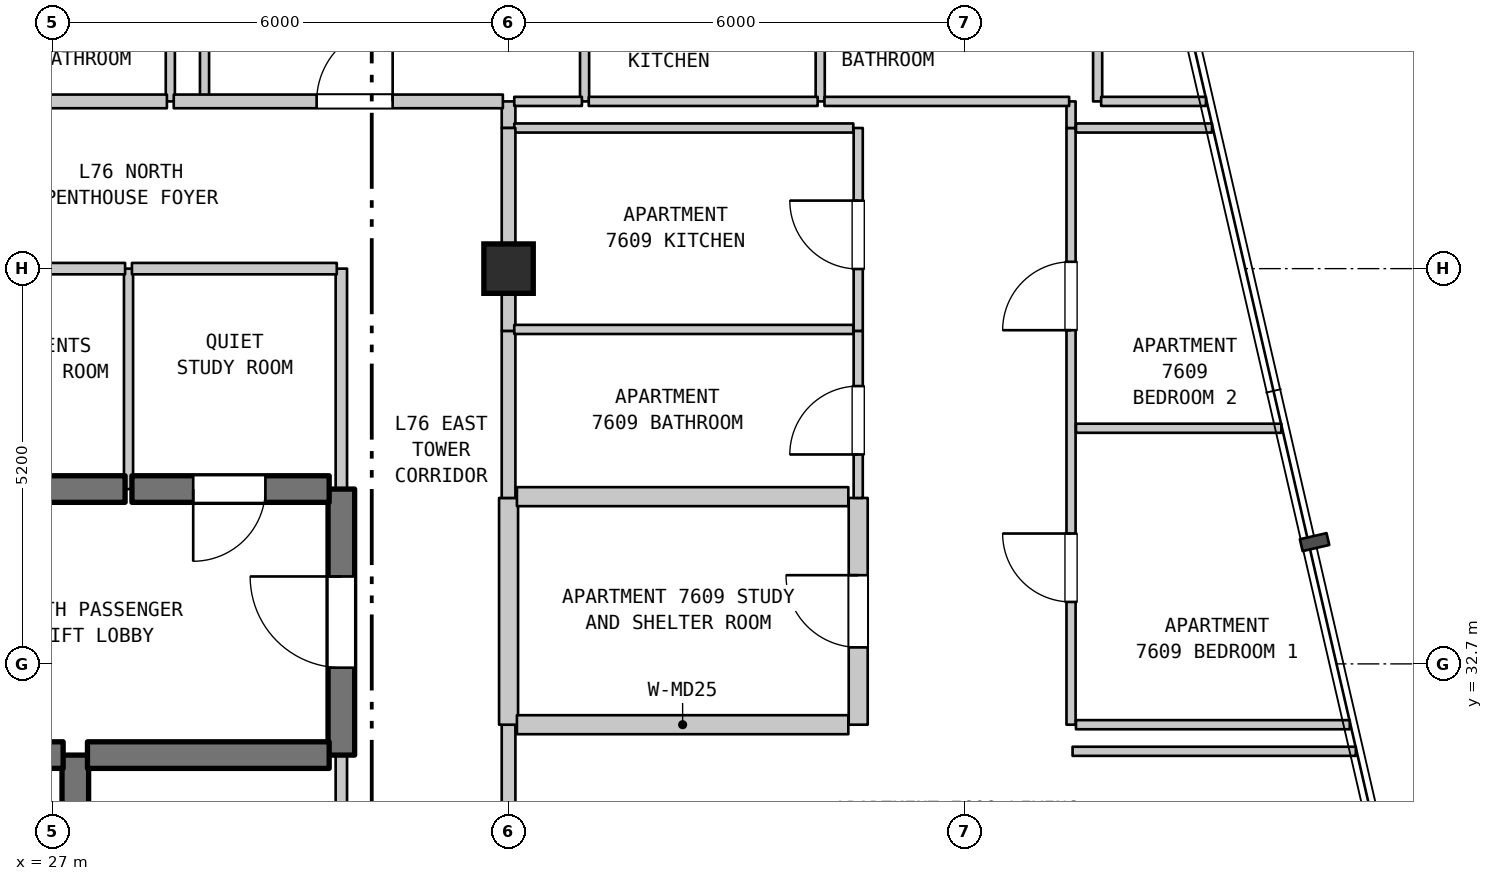
"""IFC4 building model, lengths in metres.
Left out: names, types, materials, properties, quantities, classifications, styles, units other than length and angle.
Written with IfcOpenShell. Run it as: python <this file> out.ifc"""

import sys

from ifc_helpers import new_model, si_unit, direction, frame, frame_2d, origin, origin_2d, place, context, subcontext, project, spatial, rectangle, extrude, element, fill, save


model = new_model("IFC4")
c1 = context("Model", 3, precision=1e-05, world=origin(), true_north=direction((0.0, 1.0)))
c2 = subcontext(c1, "Body", "Model", "MODEL_VIEW")
j1 = project(units=[si_unit("LENGTHUNIT", "METRE"), si_unit("PLANEANGLEUNIT", "RADIAN")], contexts=[c1])
p1 = place(None, origin())
s1 = spatial("IfcSite", under=j1, at=p1, CompositionType="ELEMENT")
p2 = place(p1, origin())
s2 = spatial("IfcBuilding", under=s1, at=p2, CompositionType="ELEMENT")
p3 = place(p2, frame((0.0, 0.0, 303.6)))
s3 = spatial("IfcBuildingStorey", under=s2, at=p3, CompositionType="ELEMENT", Elevation=303.6)
p4 = place(p3, frame((33.0, 37.9, 0.0), z_axis=(0.0, 0.0, 1.0), x_axis=(1.0, 0.0, 0.0)))
e1 = element("IfcColumn", 1, at=p4, inside=s3, PredefinedType="COLUMN", context=c2, shape_type="SweptSolid", body=[
    extrude(rectangle(XDim=0.65, YDim=0.65, at=origin_2d()), origin(), (0.0, 0.0, 1.0), 3.7),
])
p5 = place(p3, frame((27.3, 28.9, 0.0), z_axis=(0.0, 0.0, 1.0), x_axis=(0.0, 1.0, 0.0)))
e2 = element("IfcWall", 2, at=p5, inside=s3, PredefinedType="SHEAR", context=c2, shape_type="SweptSolid", body=[
    extrude(rectangle(XDim=2.6, YDim=0.35, at=frame_2d((1.3, 0.0))), origin(), (0.0, 0.0, 1.0), 3.39),
])
p6 = place(p3, frame((28.0, 35.0, 0.0), z_axis=(0.0, 0.0, 1.0), x_axis=(0.0, 1.0, 0.0)))
e3 = element("IfcWall", 3, at=p6, inside=s3, PredefinedType="PARTITIONING", context=c2, shape_type="SweptSolid", body=[
    extrude(rectangle(XDim=2.9, YDim=0.12, at=frame_2d((1.45, 0.0))), origin(), (0.0, 0.0, 1.0), 3.39),
])
p7 = place(p3, frame((28.55, 40.1, 0.0), z_axis=(0.0, 0.0, 1.0), x_axis=(0.0, 1.0, 0.0)))
e4 = element("IfcWall", 4, at=p7, inside=s3, PredefinedType="PARTITIONING", context=c2, shape_type="SweptSolid", body=[
    extrude(rectangle(XDim=2.3, YDim=0.12, at=frame_2d((1.15, 0.0))), origin(), (0.0, 0.0, 1.0), 3.39),
])
p8 = place(p3, frame((29.0, 40.1, 0.0), z_axis=(0.0, 0.0, 1.0), x_axis=(0.0, 1.0, 0.0)))
e5 = element("IfcWall", 5, at=p8, inside=s3, PredefinedType="PARTITIONING", context=c2, shape_type="SweptSolid", body=[
    extrude(rectangle(XDim=2.05, YDim=0.12, at=frame_2d((1.025, 0.0))), origin(), (0.0, 0.0, 1.0), 3.39),
])
p9 = place(p3, frame((30.8, 28.9, 0.0), z_axis=(0.0, 0.0, 1.0), x_axis=(0.0, 1.0, 0.0)))
e6 = element("IfcWall", 6, at=p9, inside=s3, PredefinedType="STANDARD", context=c2, shape_type="SweptSolid", body=[
    extrude(rectangle(XDim=2.6, YDim=0.15, at=frame_2d((1.3, 0.0))), origin(), (0.0, 0.0, 1.0), 3.39),
])
p10 = place(p3, frame((30.8, 31.5, 0.0), z_axis=(0.0, 0.0, 1.0), x_axis=(0.0, 1.0, 0.0)))
e7 = element("IfcWall", 7, at=p10, inside=s3, PredefinedType="SHEAR", context=c2, shape_type="SweptSolid", body=[
    extrude(rectangle(XDim=3.5, YDim=0.35, at=frame_2d((1.75, 0.0))), origin(), (0.0, 0.0, 1.0), 3.39),
])
p11 = place(p10, frame((1.15, 0.0, 0.0)))
e8 = element("IfcOpeningElement", 8, at=p11, cuts=e7, PredefinedType="OPENING", context=c2, shape_type="SweptSolid", body=[
    extrude(rectangle(XDim=1.2, YDim=2.2, at=frame_2d((0.6, 1.1))), frame((0.0, 0.185, 0.0), z_axis=(0.0, -1.0, 0.0), x_axis=(1.0, 0.0, 0.0)), (0.0, 0.0, 1.0), 0.37),
])
p12 = place(p3, frame((30.8, 35.0, 0.0), z_axis=(0.0, 0.0, 1.0), x_axis=(0.0, 1.0, 0.0)))
e9 = element("IfcWall", 9, at=p12, inside=s3, PredefinedType="STANDARD", context=c2, shape_type="SweptSolid", body=[
    extrude(rectangle(XDim=2.9, YDim=0.15, at=frame_2d((1.45, 0.0))), origin(), (0.0, 0.0, 1.0), 3.39),
])
p13 = place(p3, frame((33.0, 28.8, 0.0), z_axis=(0.0, 0.0, 1.0), x_axis=(0.0, 1.0, 0.0)))
e10 = element("IfcWall", 10, at=p13, inside=s3, PredefinedType="STANDARD", context=c2, shape_type="SweptSolid", body=[
    extrude(rectangle(XDim=3.1, YDim=0.18, at=frame_2d((1.55, 0.0))), origin(), (0.0, 0.0, 1.0), 2.89),
])
p14 = place(p13, frame((0.978, 0.0, 0.0)))
e11 = element("IfcOpeningElement", 11, at=p14, cuts=e10, PredefinedType="OPENING", context=c2, shape_type="SweptSolid", body=[
    extrude(rectangle(XDim=1.0, YDim=2.15, at=frame_2d((0.5, 1.075))), frame((0.0, 0.1, 0.0), z_axis=(0.0, -1.0, 0.0), x_axis=(1.0, 0.0, 0.0)), (0.0, 0.0, 1.0), 0.2),
])
p15 = place(p3, frame((33.0, 31.9, 0.0), z_axis=(0.0, 0.0, 1.0), x_axis=(0.0, 1.0, 0.0)))
e12 = element("IfcWall", 12, at=p15, inside=s3, PredefinedType="STANDARD", context=c2, shape_type="SweptSolid", body=[
    extrude(rectangle(XDim=2.983, YDim=0.25, at=frame_2d((1.492, 0.0))), origin(), (0.0, 0.0, 1.0), 2.89),
])
p16 = place(p3, frame((33.0, 34.883, 0.0), z_axis=(0.0, 0.0, 1.0), x_axis=(0.0, 1.0, 0.0)))
e13 = element("IfcWall", 13, at=p16, inside=s3, PredefinedType="STANDARD", context=c2, shape_type="SweptSolid", body=[
    extrude(rectangle(XDim=2.198, YDim=0.18, at=frame_2d((1.099, 0.0))), origin(), (0.0, 0.0, 1.0), 2.89),
])
p17 = place(p3, frame((33.0, 37.081, 0.0), z_axis=(0.0, 0.0, 1.0), x_axis=(0.0, 1.0, 0.0)))
e14 = element("IfcWall", 14, at=p17, inside=s3, PredefinedType="STANDARD", context=c2, shape_type="SweptSolid", body=[
    extrude(rectangle(XDim=0.819, YDim=0.18, at=frame_2d((0.409, 0.0))), origin(), (0.0, 0.0, 1.0), 2.89),
])
p18 = place(p3, frame((33.0, 39.75, 0.0), z_axis=(0.0, 0.0, 1.0), x_axis=(0.0, 1.0, 0.0)))
e15 = element("IfcWall", 15, at=p18, inside=s3, PredefinedType="STANDARD", context=c2, shape_type="SweptSolid", body=[
    extrude(rectangle(XDim=0.35, YDim=0.18, at=frame_2d((0.175, 0.0))), origin(), (0.0, 0.0, 1.0), 3.39),
])
for number, where, z_axis, x_axis in (
    (16, (34.0, 40.1, 0.0), (0.0, 0.0, 1.0), (0.0, 1.0, 0.0)),
    (17, (37.1, 40.1, 0.0), (0.0, 0.0, 1.0), (0.0, 1.0, 0.0)),
):
    element("IfcWall", number, at=place(p3, frame(where, z_axis=z_axis, x_axis=x_axis)), inside=s3, PredefinedType="PARTITIONING", context=c2, shape_type="SweptSolid", body=[
        extrude(rectangle(XDim=2.3, YDim=0.12, at=frame_2d((1.15, 0.0))), origin(), (0.0, 0.0, 1.0), 3.39),
    ])
p19 = place(p3, frame((37.6, 31.9, 0.0), z_axis=(0.0, 0.0, 1.0), x_axis=(0.0, 1.0, 0.0)))
e18 = element("IfcWall", 18, at=p19, inside=s3, PredefinedType="STANDARD", context=c2, shape_type="SweptSolid", body=[
    extrude(rectangle(XDim=2.983, YDim=0.25, at=frame_2d((1.492, 0.0))), origin(), (0.0, 0.0, 1.0), 3.39),
])
p20 = place(p19, frame((1.017, 0.0, 0.0)))
e19 = element("IfcOpeningElement", 19, at=p20, cuts=e18, PredefinedType="OPENING", context=c2, shape_type="SweptSolid", body=[
    extrude(rectangle(XDim=0.95, YDim=2.15, at=frame_2d((0.475, 1.075))), frame((0.0, 0.135, 0.0), z_axis=(0.0, -1.0, 0.0), x_axis=(1.0, 0.0, 0.0)), (0.0, 0.0, 1.0), 0.27),
])
p21 = place(p3, frame((37.6, 34.883, 0.0), z_axis=(0.0, 0.0, 1.0), x_axis=(0.0, 1.0, 0.0)))
e20 = element("IfcWall", 20, at=p21, inside=s3, PredefinedType="PARTITIONING", context=c2, shape_type="SweptSolid", body=[
    extrude(rectangle(XDim=2.198, YDim=0.12, at=frame_2d((1.099, 0.0))), origin(), (0.0, 0.0, 1.0), 3.39),
])
p22 = place(p21, frame((0.572, 0.0, 0.0)))
e21 = element("IfcOpeningElement", 21, at=p22, cuts=e20, PredefinedType="OPENING", context=c2, shape_type="SweptSolid", body=[
    extrude(rectangle(XDim=0.9, YDim=2.1, at=frame_2d((0.45, 1.05))), frame((0.0, 0.07, 0.0), z_axis=(0.0, -1.0, 0.0), x_axis=(1.0, 0.0, 0.0)), (0.0, 0.0, 1.0), 0.14),
])
p23 = place(p3, frame((37.6, 37.081, 0.0), z_axis=(0.0, 0.0, 1.0), x_axis=(0.0, 1.0, 0.0)))
e22 = element("IfcWall", 22, at=p23, inside=s3, PredefinedType="PARTITIONING", context=c2, shape_type="SweptSolid", body=[
    extrude(rectangle(XDim=2.669, YDim=0.12, at=frame_2d((1.334, 0.0))), origin(), (0.0, 0.0, 1.0), 3.39),
])
p24 = place(p23, frame((0.814, 0.0, 0.0)))
e23 = element("IfcOpeningElement", 23, at=p24, cuts=e22, PredefinedType="OPENING", context=c2, shape_type="SweptSolid", body=[
    extrude(rectangle(XDim=0.9, YDim=2.15, at=frame_2d((0.45, 1.075))), frame((0.0, 0.07, 0.0), z_axis=(0.0, -1.0, 0.0), x_axis=(1.0, 0.0, 0.0)), (0.0, 0.0, 1.0), 0.14),
])
p25 = place(p3, frame((40.4, 31.9, 0.0), z_axis=(0.0, 0.0, 1.0), x_axis=(0.0, 1.0, 0.0)))
e24 = element("IfcWall", 24, at=p25, inside=s3, PredefinedType="PARTITIONING", context=c2, shape_type="SweptSolid", body=[
    extrude(rectangle(XDim=7.85, YDim=0.12, at=frame_2d((3.925, 0.0))), origin(), (0.0, 0.0, 1.0), 3.39),
])
p26 = place(p25, frame((1.615, 0.0, 0.0)))
e25 = element("IfcOpeningElement", 25, at=p26, cuts=e24, PredefinedType="OPENING", context=c2, shape_type="SweptSolid", body=[
    extrude(rectangle(XDim=0.9, YDim=2.15, at=frame_2d((0.45, 1.075))), frame((0.0, 0.07, 0.0), z_axis=(0.0, -1.0, 0.0), x_axis=(1.0, 0.0, 0.0)), (0.0, 0.0, 1.0), 0.14),
])
p27 = place(p25, frame((5.19, 0.0, 0.0)))
e26 = element("IfcOpeningElement", 26, at=p27, cuts=e24, PredefinedType="OPENING", context=c2, shape_type="SweptSolid", body=[
    extrude(rectangle(XDim=0.9, YDim=2.15, at=frame_2d((0.45, 1.075))), frame((0.0, 0.07, 0.0), z_axis=(0.0, -1.0, 0.0), x_axis=(1.0, 0.0, 0.0)), (0.0, 0.0, 1.0), 0.14),
])
p28 = place(p3, frame((40.4, 39.75, 0.0), z_axis=(0.0, 0.0, 1.0), x_axis=(0.0, 1.0, 0.0)))
e27 = element("IfcWall", 27, at=p28, inside=s3, PredefinedType="PARTITIONING", context=c2, shape_type="SweptSolid", body=[
    extrude(rectangle(XDim=0.35, YDim=0.12, at=frame_2d((0.175, 0.0))), origin(), (0.0, 0.0, 1.0), 3.39),
])
p29 = place(p3, frame((40.75, 40.1, 0.0), z_axis=(0.0, 0.0, 1.0), x_axis=(0.0, 1.0, 0.0)))
e28 = element("IfcWall", 28, at=p29, inside=s3, PredefinedType="PARTITIONING", context=c2, shape_type="SweptSolid", body=[
    extrude(rectangle(XDim=2.3, YDim=0.12, at=frame_2d((1.15, 0.0))), origin(), (0.0, 0.0, 1.0), 3.39),
])
p30 = place(p3, frame((23.96, 31.5, 0.0), z_axis=(0.0, 0.0, 1.0), x_axis=(1.0, 0.0, 0.0)))
e29 = element("IfcWall", 29, at=p30, inside=s3, PredefinedType="SHEAR", context=c2, shape_type="SweptSolid", body=[
    extrude(rectangle(XDim=3.18, YDim=0.35, at=frame_2d((1.59, 0.0))), origin(), (0.0, 0.0, 1.0), 3.39),
])
p31 = place(p30, frame((1.094, 0.0, 0.0)))
e30 = element("IfcOpeningElement", 30, at=p31, cuts=e29, PredefinedType="OPENING", context=c2, shape_type="SweptSolid", body=[
    extrude(rectangle(XDim=0.85, YDim=2.1, at=frame_2d((0.425, 1.05))), frame((0.0, 0.185, 0.0), z_axis=(0.0, -1.0, 0.0), x_axis=(1.0, 0.0, 0.0)), (0.0, 0.0, 1.0), 0.37),
])
p32 = place(p3, frame((27.46, 31.5, 0.0), z_axis=(0.0, 0.0, 1.0), x_axis=(1.0, 0.0, 0.0)))
e31 = element("IfcWall", 31, at=p32, inside=s3, PredefinedType="SHEAR", context=c2, shape_type="SweptSolid", body=[
    extrude(rectangle(XDim=3.18, YDim=0.35, at=frame_2d((1.59, 0.0))), origin(), (0.0, 0.0, 1.0), 3.39),
])
p33 = place(p3, frame((40.42, 31.55, 0.0), z_axis=(0.0, 0.0, 1.0), x_axis=(1.0, 0.0, 0.0)))
e32 = element("IfcWall", 32, at=p33, inside=s3, PredefinedType="PARTITIONING", context=c2, shape_type="SweptSolid", body=[
    extrude(rectangle(XDim=3.727, YDim=0.12, at=frame_2d((1.864, 0.0))), origin(), (0.0, 0.0, 1.0), 3.39),
])
p34 = place(p3, frame((33.11, 31.9, 0.0), z_axis=(0.0, 0.0, 1.0), x_axis=(1.0, 0.0, 0.0)))
e33 = element("IfcWall", 33, at=p34, inside=s3, PredefinedType="STANDARD", context=c2, shape_type="SweptSolid", body=[
    extrude(rectangle(XDim=4.36, YDim=0.25, at=frame_2d((2.18, 0.0))), origin(), (0.0, 0.0, 1.0), 3.39),
])
p35 = place(p3, frame((40.465, 31.9, 0.0), z_axis=(0.0, 0.0, 1.0), x_axis=(1.0, 0.0, 0.0)))
e34 = element("IfcWall", 34, at=p35, inside=s3, PredefinedType="PARTITIONING", context=c2, shape_type="SweptSolid", body=[
    extrude(rectangle(XDim=3.602, YDim=0.12, at=frame_2d((1.801, 0.0))), origin(), (0.0, 0.0, 1.0), 3.39),
])
p36 = place(p3, frame((33.11, 34.9, 0.0), z_axis=(0.0, 0.0, 1.0), x_axis=(1.0, 0.0, 0.0)))
e35 = element("IfcWall", 35, at=p36, inside=s3, PredefinedType="STANDARD", context=c2, shape_type="SweptSolid", body=[
    extrude(rectangle(XDim=4.36, YDim=0.25, at=frame_2d((2.18, 0.0))), origin(), (0.0, 0.0, 1.0), 3.39),
])
p37 = place(p3, frame((23.96, 35.0, 0.0), z_axis=(0.0, 0.0, 1.0), x_axis=(1.0, 0.0, 0.0)))
e36 = element("IfcWall", 36, at=p37, inside=s3, PredefinedType="SHEAR", context=c2, shape_type="SweptSolid", body=[
    extrude(rectangle(XDim=3.995, YDim=0.35, at=frame_2d((1.998, 0.0))), origin(), (0.0, 0.0, 1.0), 3.39),
])
p38 = place(p37, frame((1.393, 0.0, 0.0)))
e37 = element("IfcOpeningElement", 37, at=p38, cuts=e36, PredefinedType="OPENING", context=c2, shape_type="SweptSolid", body=[
    extrude(rectangle(XDim=0.95, YDim=2.15, at=frame_2d((0.475, 1.075))), frame((0.0, 0.185, 0.0), z_axis=(0.0, -1.0, 0.0), x_axis=(1.0, 0.0, 0.0)), (0.0, 0.0, 1.0), 0.37),
])
p39 = place(p3, frame((28.045, 35.0, 0.0), z_axis=(0.0, 0.0, 1.0), x_axis=(1.0, 0.0, 0.0)))
e38 = element("IfcWall", 38, at=p39, inside=s3, PredefinedType="SHEAR", context=c2, shape_type="SweptSolid", body=[
    extrude(rectangle(XDim=2.595, YDim=0.35, at=frame_2d((1.297, 0.0))), origin(), (0.0, 0.0, 1.0), 3.39),
])
p40 = place(p39, frame((0.806, 0.0, 0.0)))
e39 = element("IfcOpeningElement", 39, at=p40, cuts=e38, PredefinedType="OPENING", context=c2, shape_type="SweptSolid", body=[
    extrude(rectangle(XDim=0.95, YDim=2.15, at=frame_2d((0.475, 1.075))), frame((0.0, 0.185, 0.0), z_axis=(0.0, -1.0, 0.0), x_axis=(1.0, 0.0, 0.0)), (0.0, 0.0, 1.0), 0.37),
])
p41 = place(p3, frame((40.465, 35.8, 0.0), z_axis=(0.0, 0.0, 1.0), x_axis=(1.0, 0.0, 0.0)))
e40 = element("IfcWall", 40, at=p41, inside=s3, PredefinedType="PARTITIONING", context=c2, shape_type="SweptSolid", body=[
    extrude(rectangle(XDim=2.702, YDim=0.12, at=frame_2d((1.351, 0.0))), origin(), (0.0, 0.0, 1.0), 3.39),
])
p42 = place(p3, frame((33.075, 37.1, 0.0), z_axis=(0.0, 0.0, 1.0), x_axis=(1.0, 0.0, 0.0)))
e41 = element("IfcWall", 41, at=p42, inside=s3, PredefinedType="PARTITIONING", context=c2, shape_type="SweptSolid", body=[
    extrude(rectangle(XDim=4.46, YDim=0.12, at=frame_2d((2.23, 0.0))), origin(), (0.0, 0.0, 1.0), 3.39),
])
p43 = place(p3, frame((23.96, 37.9, 0.0), z_axis=(0.0, 0.0, 1.0), x_axis=(1.0, 0.0, 0.0)))
e42 = element("IfcWall", 42, at=p43, inside=s3, PredefinedType="STANDARD", context=c2, shape_type="SweptSolid", body=[
    extrude(rectangle(XDim=3.995, YDim=0.15, at=frame_2d((1.998, 0.0))), origin(), (0.0, 0.0, 1.0), 2.89),
])
p44 = place(p3, frame((28.045, 37.9, 0.0), z_axis=(0.0, 0.0, 1.0), x_axis=(1.0, 0.0, 0.0)))
e43 = element("IfcWall", 43, at=p44, inside=s3, PredefinedType="STANDARD", context=c2, shape_type="SweptSolid", body=[
    extrude(rectangle(XDim=2.695, YDim=0.15, at=frame_2d((1.348, 0.0))), origin(), (0.0, 0.0, 1.0), 2.89),
])
p45 = place(p3, frame((33.075, 39.75, 0.0), z_axis=(0.0, 0.0, 1.0), x_axis=(1.0, 0.0, 0.0)))
e44 = element("IfcWall", 44, at=p45, inside=s3, PredefinedType="PARTITIONING", context=c2, shape_type="SweptSolid", body=[
    extrude(rectangle(XDim=4.46, YDim=0.12, at=frame_2d((2.23, 0.0))), origin(), (0.0, 0.0, 1.0), 3.39),
])
p46 = place(p3, frame((40.465, 39.75, 0.0), z_axis=(0.0, 0.0, 1.0), x_axis=(1.0, 0.0, 0.0)))
e45 = element("IfcWall", 45, at=p46, inside=s3, PredefinedType="PARTITIONING", context=c2, shape_type="SweptSolid", body=[
    extrude(rectangle(XDim=1.79, YDim=0.12, at=frame_2d((0.895, 0.0))), origin(), (0.0, 0.0, 1.0), 3.39),
])
p47 = place(p3, frame((25.22, 40.1, 0.0), z_axis=(0.0, 0.0, 1.0), x_axis=(1.0, 0.0, 0.0)))
e46 = element("IfcWall", 46, at=p47, inside=s3, PredefinedType="STANDARD", context=c2, shape_type="SweptSolid", body=[
    extrude(rectangle(XDim=3.285, YDim=0.18, at=frame_2d((1.643, 0.0))), origin(), (0.0, 0.0, 1.0), 3.39),
])
p48 = place(p3, frame((28.595, 40.1, 0.0), z_axis=(0.0, 0.0, 1.0), x_axis=(1.0, 0.0, 0.0)))
e47 = element("IfcWall", 47, at=p48, inside=s3, PredefinedType="STANDARD", context=c2, shape_type="SweptSolid", body=[
    extrude(rectangle(XDim=4.33, YDim=0.18, at=frame_2d((2.165, 0.0))), origin(), (0.0, 0.0, 1.0), 3.39),
])
p49 = place(p48, frame((1.88, 0.0, 0.0)))
e48 = element("IfcOpeningElement", 48, at=p49, cuts=e47, PredefinedType="OPENING", context=c2, shape_type="SweptSolid", body=[
    extrude(rectangle(XDim=1.0, YDim=2.15, at=frame_2d((0.5, 1.075))), frame((0.0, 0.1, 0.0), z_axis=(0.0, -1.0, 0.0), x_axis=(1.0, 0.0, 0.0)), (0.0, 0.0, 1.0), 0.2),
])
p50 = place(p3, frame((33.075, 40.1, 0.0), z_axis=(0.0, 0.0, 1.0), x_axis=(1.0, 0.0, 0.0)))
e49 = element("IfcWall", 49, at=p50, inside=s3, PredefinedType="PARTITIONING", context=c2, shape_type="SweptSolid", body=[
    extrude(rectangle(XDim=0.89, YDim=0.12, at=frame_2d((0.445, 0.0))), origin(), (0.0, 0.0, 1.0), 3.39),
])
p51 = place(p3, frame((34.055, 40.1, 0.0), z_axis=(0.0, 0.0, 1.0), x_axis=(1.0, 0.0, 0.0)))
e50 = element("IfcWall", 50, at=p51, inside=s3, PredefinedType="PARTITIONING", context=c2, shape_type="SweptSolid", body=[
    extrude(rectangle(XDim=3.011, YDim=0.12, at=frame_2d((1.505, 0.0))), origin(), (0.0, 0.0, 1.0), 3.39),
])
p52 = place(p3, frame((37.156, 40.1, 0.0), z_axis=(0.0, 0.0, 1.0), x_axis=(1.0, 0.0, 0.0)))
e51 = element("IfcWall", 51, at=p52, inside=s3, PredefinedType="PARTITIONING", context=c2, shape_type="SweptSolid", body=[
    extrude(rectangle(XDim=3.219, YDim=0.12, at=frame_2d((1.609, 0.0))), origin(), (0.0, 0.0, 1.0), 3.39),
])
p53 = place(p3, frame((40.796, 40.1, 0.0), z_axis=(0.0, 0.0, 1.0), x_axis=(1.0, 0.0, 0.0)))
e52 = element("IfcWall", 52, at=p53, inside=s3, PredefinedType="PARTITIONING", context=c2, shape_type="SweptSolid", body=[
    extrude(rectangle(XDim=1.379, YDim=0.12, at=frame_2d((0.689, 0.0))), origin(), (0.0, 0.0, 1.0), 3.39),
])
p54 = place(p3, frame((33.0, 37.9, 0.0), z_axis=(0.0, 0.0, 1.0), x_axis=(0.0, 1.0, 0.0)))
e53 = element("IfcWall", 53, at=p54, inside=s3, PredefinedType="STANDARD", context=c2, shape_type="SweptSolid", body=[
    extrude(rectangle(XDim=1.85, YDim=0.18, at=frame_2d((0.925, 0.0))), origin(), (0.0, 0.0, 1.0), 2.79),
])
p55 = place(p11, origin())
e54 = element("IfcDoor", 54, at=p55, inside=s3, OperationType="SINGLE_SWING_RIGHT", PredefinedType="DOOR", context=c2, shape_type="SweptSolid", body=[
    extrude(rectangle(XDim=1.2, YDim=2.2, at=frame_2d((0.6, 1.1))), frame((0.0, 0.025, 0.0), z_axis=(0.0, -1.0, 0.0), x_axis=(1.0, 0.0, 0.0)), (0.0, 0.0, 1.0), 0.05),
])
fill(e8, e54)
p56 = place(p20, origin())
e55 = element("IfcDoor", 55, at=p56, inside=s3, OperationType="SINGLE_SWING_RIGHT", PredefinedType="DOOR", context=c2, shape_type="SweptSolid", body=[
    extrude(rectangle(XDim=0.95, YDim=2.15, at=frame_2d((0.475, 1.075))), frame((0.0, 0.025, 0.0), z_axis=(0.0, -1.0, 0.0), x_axis=(1.0, 0.0, 0.0)), (0.0, 0.0, 1.0), 0.05),
])
fill(e19, e55)
p57 = place(p22, origin())
e56 = element("IfcDoor", 56, at=p57, inside=s3, OperationType="SINGLE_SWING_LEFT", PredefinedType="DOOR", context=c2, shape_type="SweptSolid", body=[
    extrude(rectangle(XDim=0.9, YDim=2.1, at=frame_2d((0.45, 1.05))), frame((0.0, 0.025, 0.0), z_axis=(0.0, -1.0, 0.0), x_axis=(1.0, 0.0, 0.0)), (0.0, 0.0, 1.0), 0.05),
])
fill(e21, e56)
p58 = place(p24, origin())
e57 = element("IfcDoor", 57, at=p58, inside=s3, OperationType="SINGLE_SWING_RIGHT", PredefinedType="DOOR", context=c2, shape_type="SweptSolid", body=[
    extrude(rectangle(XDim=0.9, YDim=2.15, at=frame_2d((0.45, 1.075))), frame((0.0, 0.025, 0.0), z_axis=(0.0, -1.0, 0.0), x_axis=(1.0, 0.0, 0.0)), (0.0, 0.0, 1.0), 0.05),
])
fill(e23, e57)
p59 = place(p26, origin())
e58 = element("IfcDoor", 58, at=p59, inside=s3, OperationType="SINGLE_SWING_RIGHT", PredefinedType="DOOR", context=c2, shape_type="SweptSolid", body=[
    extrude(rectangle(XDim=0.9, YDim=2.15, at=frame_2d((0.45, 1.075))), frame((0.0, 0.025, 0.0), z_axis=(0.0, -1.0, 0.0), x_axis=(1.0, 0.0, 0.0)), (0.0, 0.0, 1.0), 0.05),
])
fill(e25, e58)
p60 = place(p27, origin())
e59 = element("IfcDoor", 59, at=p60, inside=s3, OperationType="SINGLE_SWING_LEFT", PredefinedType="DOOR", context=c2, shape_type="SweptSolid", body=[
    extrude(rectangle(XDim=0.9, YDim=2.15, at=frame_2d((0.45, 1.075))), frame((0.0, 0.025, 0.0), z_axis=(0.0, -1.0, 0.0), x_axis=(1.0, 0.0, 0.0)), (0.0, 0.0, 1.0), 0.05),
])
fill(e26, e59)
p61 = place(p40, frame((0.95, 0.0, 0.0), z_axis=(0.0, 0.0, 1.0), x_axis=(-1.0, 0.0, 0.0)))
e60 = element("IfcDoor", 60, at=p61, inside=s3, OperationType="SINGLE_SWING_LEFT", PredefinedType="DOOR", context=c2, shape_type="SweptSolid", body=[
    extrude(rectangle(XDim=0.95, YDim=2.15, at=frame_2d((0.475, 1.075))), frame((0.0, 0.025, 0.0), z_axis=(0.0, -1.0, 0.0), x_axis=(1.0, 0.0, 0.0)), (0.0, 0.0, 1.0), 0.05),
])
fill(e39, e60)
p62 = place(p49, origin())
e61 = element("IfcDoor", 61, at=p62, inside=s3, OperationType="SINGLE_SWING_RIGHT", PredefinedType="DOOR", context=c2, shape_type="SweptSolid", body=[
    extrude(rectangle(XDim=1.0, YDim=2.15, at=frame_2d((0.5, 1.075))), frame((0.0, 0.025, 0.0), z_axis=(0.0, -1.0, 0.0), x_axis=(1.0, 0.0, 0.0)), (0.0, 0.0, 1.0), 0.05),
])
fill(e48, e61)
save(model, sys.argv[1])
